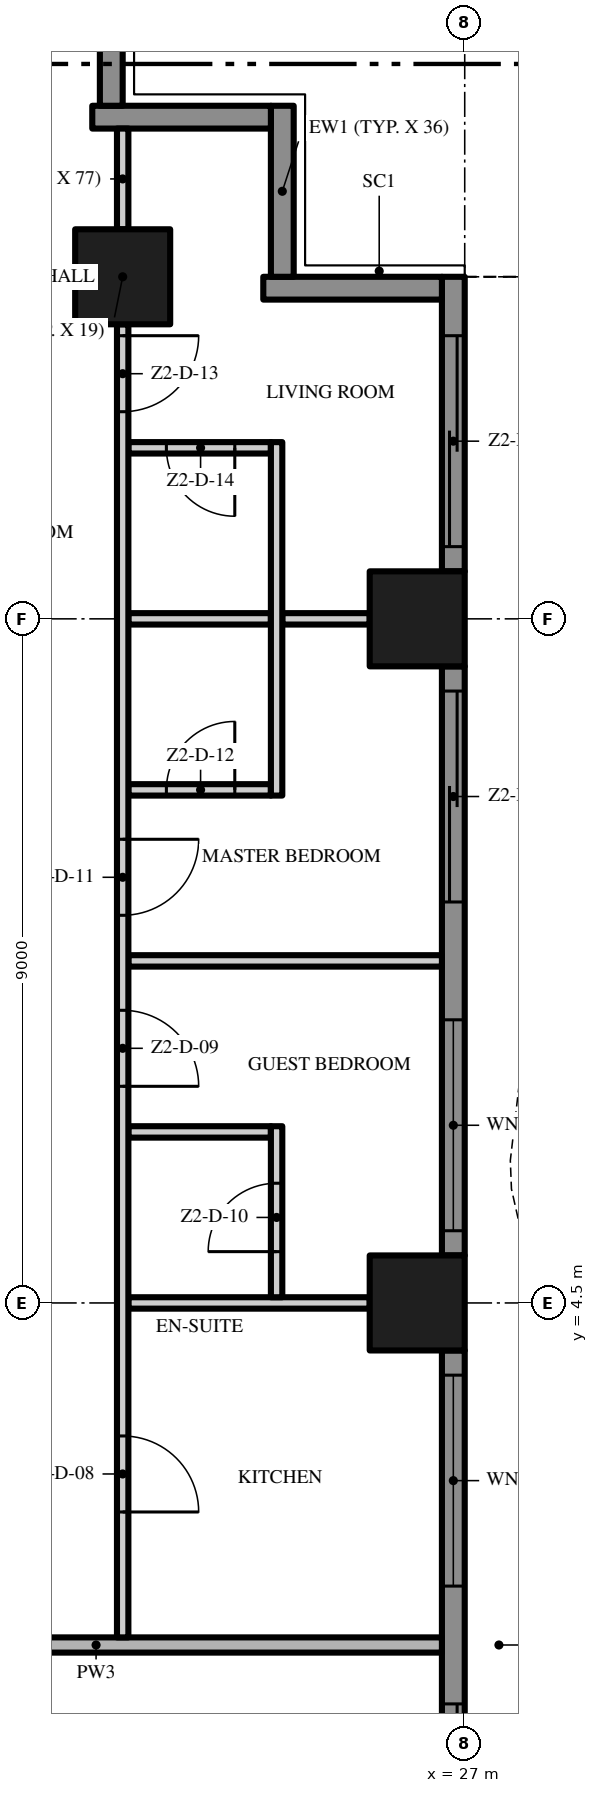
"""IFC4 building model, lengths in metres.
Left out: names, types, materials, properties, quantities, classifications, styles, units other than length and angle.
Written with IfcOpenShell. Run it as: python <this file> out.ifc"""

import sys

from ifc_helpers import new_model, si_unit, direction, frame, frame_2d, origin, origin_2d, place, context, subcontext, project, spatial, polyline, rectangle, outline, extrude, element, fill, save


model = new_model("IFC4")
c1 = context("Model", 3, precision=1e-05, world=origin(), true_north=direction((0.0, 1.0)))
c2 = subcontext(c1, "Body", "Model", "MODEL_VIEW")
j1 = project(units=[si_unit("LENGTHUNIT", "METRE"), si_unit("PLANEANGLEUNIT", "RADIAN")], contexts=[c1])
p1 = place(None, origin())
s1 = spatial("IfcSite", under=j1, at=p1, CompositionType="ELEMENT")
p2 = place(p1, origin())
s2 = spatial("IfcBuilding", under=s1, at=p2, CompositionType="ELEMENT")
p3 = place(p2, frame((0.0, 0.0, 111.2)))
s3 = spatial("IfcBuildingStorey", under=s2, at=p3, CompositionType="ELEMENT", Elevation=111.2)
for number, where, z_axis, x_axis in (
    (1, (26.375, 13.5, 0.0), (0.0, 0.0, 1.0), (1.0, 0.0, 0.0)),
    (2, (22.5, 18.0, 0.0), (0.0, 0.0, 1.0), (1.0, 0.0, 0.0)),
    (3, (26.375, 4.5, 0.0), (0.0, 0.0, 1.0), (1.0, 0.0, 0.0)),
):
    element("IfcColumn", number, at=place(p3, frame(where, z_axis=z_axis, x_axis=x_axis)), inside=s3, PredefinedType="COLUMN", context=c2, shape_type="SweptSolid", body=[
        extrude(rectangle(XDim=1.25, YDim=1.25, at=origin_2d()), origin(), (0.0, 0.0, 1.0), 3.5),
    ])
p4 = place(p3, frame((26.85, 3.875, 0.0), z_axis=(0.0, 0.0, 1.0), x_axis=(0.0, -1.0, 0.0)))
e4 = element("IfcWall", 4, at=p4, inside=s3, PredefinedType="SOLIDWALL", context=c2, shape_type="SweptSolid", body=[
    extrude(rectangle(XDim=7.75, YDim=0.3, at=frame_2d((3.875, 0.0))), origin(), (0.0, 0.0, 1.0), 3.5),
])
p5 = place(p4, frame((4.65, 0.0, 0.0)))
e5 = element("IfcOpeningElement", 5, at=p5, cuts=e4, PredefinedType="OPENING", context=c2, shape_type="SweptSolid", body=[
    extrude(rectangle(XDim=2.775, YDim=2.4, at=frame_2d((1.387, 1.2))), frame((0.0, 0.16, 0.0), z_axis=(0.0, -1.0, 0.0), x_axis=(1.0, 0.0, 0.0)), (0.0, 0.0, 1.0), 0.32),
])
p6 = place(p4, frame((0.325, 0.0, 0.45)))
e6 = element("IfcOpeningElement", 6, at=p6, cuts=e4, PredefinedType="OPENING", context=c2, shape_type="SweptSolid", body=[
    extrude(rectangle(XDim=2.775, YDim=2.65, at=frame_2d((1.387, 1.325))), frame((0.0, 0.16, 0.0), z_axis=(0.0, -1.0, 0.0), x_axis=(1.0, 0.0, 0.0)), (0.0, 0.0, 1.0), 0.32),
])
p7 = place(p3, frame((26.85, 12.875, 0.0), z_axis=(0.0, 0.0, 1.0), x_axis=(0.0, -1.0, 0.0)))
e7 = element("IfcWall", 7, at=p7, inside=s3, PredefinedType="SOLIDWALL", context=c2, shape_type="SweptSolid", body=[
    extrude(rectangle(XDim=7.75, YDim=0.3, at=frame_2d((3.875, 0.0))), origin(), (0.0, 0.0, 1.0), 3.5),
])
p8 = place(p7, frame((4.65, 0.0, 0.45)))
e8 = element("IfcOpeningElement", 8, at=p8, cuts=e7, PredefinedType="OPENING", context=c2, shape_type="SweptSolid", body=[
    extrude(rectangle(XDim=2.775, YDim=2.65, at=frame_2d((1.387, 1.325))), frame((0.0, 0.16, 0.0), z_axis=(0.0, -1.0, 0.0), x_axis=(1.0, 0.0, 0.0)), (0.0, 0.0, 1.0), 0.32),
])
p9 = place(p7, frame((0.325, 0.0, 0.0)))
e9 = element("IfcOpeningElement", 9, at=p9, cuts=e7, PredefinedType="OPENING", context=c2, shape_type="SweptSolid", body=[
    extrude(rectangle(XDim=2.775, YDim=2.4, at=frame_2d((1.387, 1.2))), frame((0.0, 0.16, 0.0), z_axis=(0.0, -1.0, 0.0), x_axis=(1.0, 0.0, 0.0)), (0.0, 0.0, 1.0), 0.32),
])
p10 = place(p3, frame((26.85, 18.0, 0.0), z_axis=(0.0, 0.0, 1.0), x_axis=(0.0, -1.0, 0.0)))
e10 = element("IfcWall", 10, at=p10, inside=s3, PredefinedType="SOLIDWALL", context=c2, shape_type="SweptSolid", body=[
    extrude(rectangle(XDim=3.875, YDim=0.3, at=frame_2d((1.938, 0.0))), origin(), (0.0, 0.0, 1.0), 3.5),
])
p11 = place(p10, frame((0.775, 0.0, 0.0)))
e11 = element("IfcOpeningElement", 11, at=p11, cuts=e10, PredefinedType="OPENING", context=c2, shape_type="SweptSolid", body=[
    extrude(rectangle(XDim=2.775, YDim=2.4, at=frame_2d((1.387, 1.2))), frame((0.0, 0.16, 0.0), z_axis=(0.0, -1.0, 0.0), x_axis=(1.0, 0.0, 0.0)), (0.0, 0.0, 1.0), 0.32),
])
p12 = place(p3, frame((24.35, 17.85, 0.0), z_axis=(0.0, 0.0, 1.0), x_axis=(1.0, 0.0, 0.0)))
e12 = element("IfcWall", 12, at=p12, inside=s3, PredefinedType="SOLIDWALL", context=c2, shape_type="SweptSolid", body=[
    extrude(rectangle(XDim=2.35, YDim=0.3, at=frame_2d((1.175, 0.0))), origin(), (0.0, 0.0, 1.0), 3.5),
])
p13 = place(p3, frame((24.6, 20.25, 0.0), z_axis=(0.0, 0.0, 1.0), x_axis=(0.0, -1.0, 0.0)))
e13 = element("IfcWall", 13, at=p13, inside=s3, PredefinedType="SOLIDWALL", context=c2, shape_type="SweptSolid", body=[
    extrude(rectangle(XDim=2.25, YDim=0.3, at=frame_2d((1.125, 0.0))), origin(), (0.0, 0.0, 1.0), 3.5),
])
p14 = place(p3, frame((22.1, 20.1, 0.0), z_axis=(0.0, 0.0, 1.0), x_axis=(1.0, 0.0, 0.0)))
e14 = element("IfcWall", 14, at=p14, inside=s3, PredefinedType="SOLIDWALL", context=c2, shape_type="SweptSolid", body=[
    extrude(rectangle(XDim=2.35, YDim=0.3, at=frame_2d((1.175, 0.0))), origin(), (0.0, 0.0, 1.0), 3.5),
])
p15 = place(p3, frame((22.35, 22.5, 0.0), z_axis=(0.0, 0.0, 1.0), x_axis=(0.0, -1.0, 0.0)))
e15 = element("IfcWall", 15, at=p15, inside=s3, PredefinedType="SOLIDWALL", context=c2, shape_type="SweptSolid", body=[
    extrude(rectangle(XDim=2.25, YDim=0.3, at=frame_2d((1.125, 0.0))), origin(), (0.0, 0.0, 1.0), 3.5),
])
p16 = place(p3, origin())
e16 = element("IfcWall", 16, at=p16, inside=s3, PredefinedType="USERDEFINED", context=c2, shape_type="SweptSolid", body=[
    extrude(outline(polyline([(29.649, -18.0), (29.985, -16.5), (30.0, -16.125), (29.869, -15.0), (29.345, -13.5), (28.612, -12.0), (27.951, -10.5), (27.615, -9.0), (27.6, -8.625), (27.731, -7.5), (28.255, -6.0), (28.988, -4.5), (29.649, -3.0), (29.985, -1.5), (30.0, -1.125), (29.869, 0.0), (29.345, 1.5), (28.612, 3.0), (27.951, 4.5), (27.615, 6.0), (27.6, 6.375), (27.731, 7.5), (28.255, 9.0), (28.988, 10.5), (29.649, 12.0), (29.985, 13.5), (30.0, 13.875), (29.869, 15.0), (29.345, 16.5), (28.612, 18.0), (28.388, 17.89), (29.114, 16.404), (29.624, 14.944), (29.749, 13.865), (29.736, 13.533), (29.41, 12.079), (28.761, 10.605), (28.024, 9.096), (27.486, 7.556), (27.349, 6.385), (27.366, 5.967), (27.713, 4.421), (28.385, 2.895), (29.114, 1.404), (29.624, -0.056), (29.749, -1.135), (29.736, -1.467), (29.41, -2.921), (28.761, -4.395), (28.024, -5.904), (27.486, -7.444), (27.349, -8.615), (27.366, -9.033), (27.713, -10.579), (28.385, -12.105), (29.114, -13.596), (29.624, -15.056), (29.749, -16.135), (29.736, -16.467), (29.405, -17.945), (29.649, -18.0)])), origin(), (0.0, 0.0, 1.0), 0.9),
])
p17 = place(p3, frame((17.6, 0.0, 0.0), z_axis=(0.0, 0.0, 1.0), x_axis=(1.0, 0.0, 0.0)))
e17 = element("IfcWall", 17, at=p17, inside=s3, PredefinedType="PARTITIONING", context=c2, shape_type="SweptSolid", body=[
    extrude(rectangle(XDim=9.1, YDim=0.2, at=frame_2d((4.55, 0.0))), origin(), (0.0, 0.0, 1.0), 3.5),
])
p18 = place(p3, frame((22.575, 4.5, 0.0), z_axis=(0.0, 0.0, 1.0), x_axis=(1.0, 0.0, 0.0)))
e18 = element("IfcWall", 18, at=p18, inside=s3, PredefinedType="PARTITIONING", context=c2, shape_type="SweptSolid", body=[
    extrude(rectangle(XDim=3.175, YDim=0.15, at=frame_2d((1.587, 0.0))), origin(), (0.0, 0.0, 1.0), 3.5),
])
p19 = place(p3, frame((22.575, 6.75, 0.0), z_axis=(0.0, 0.0, 1.0), x_axis=(1.0, 0.0, 0.0)))
e19 = element("IfcWall", 19, at=p19, inside=s3, PredefinedType="PARTITIONING", context=c2, shape_type="SweptSolid", body=[
    extrude(rectangle(XDim=1.875, YDim=0.15, at=frame_2d((0.938, 0.0))), origin(), (0.0, 0.0, 1.0), 3.5),
])
p20 = place(p3, frame((22.575, 9.0, 0.0), z_axis=(0.0, 0.0, 1.0), x_axis=(1.0, 0.0, 0.0)))
e20 = element("IfcWall", 20, at=p20, inside=s3, PredefinedType="PARTITIONING", context=c2, shape_type="SweptSolid", body=[
    extrude(rectangle(XDim=4.125, YDim=0.15, at=frame_2d((2.062, 0.0))), origin(), (0.0, 0.0, 1.0), 3.5),
])
p21 = place(p3, frame((22.575, 11.25, 0.0), z_axis=(0.0, 0.0, 1.0), x_axis=(1.0, 0.0, 0.0)))
e21 = element("IfcWall", 21, at=p21, inside=s3, PredefinedType="PARTITIONING", context=c2, shape_type="SweptSolid", body=[
    extrude(rectangle(XDim=1.875, YDim=0.15, at=frame_2d((0.938, 0.0))), origin(), (0.0, 0.0, 1.0), 3.5),
])
p22 = place(p21, frame((0.5, 0.0, 0.0)))
e22 = element("IfcOpeningElement", 22, at=p22, cuts=e21, PredefinedType="OPENING", context=c2, shape_type="SweptSolid", body=[
    extrude(rectangle(XDim=0.9, YDim=2.1, at=frame_2d((0.45, 1.05))), frame((0.0, 0.085, 0.0), z_axis=(0.0, -1.0, 0.0), x_axis=(1.0, 0.0, 0.0)), (0.0, 0.0, 1.0), 0.17),
])
p23 = place(p3, frame((22.575, 13.5, 0.0), z_axis=(0.0, 0.0, 1.0), x_axis=(1.0, 0.0, 0.0)))
e23 = element("IfcWall", 23, at=p23, inside=s3, PredefinedType="PARTITIONING", context=c2, shape_type="SweptSolid", body=[
    extrude(rectangle(XDim=1.875, YDim=0.15, at=frame_2d((0.938, 0.0))), origin(), (0.0, 0.0, 1.0), 3.5),
])
p24 = place(p3, frame((24.6, 13.5, 0.0), z_axis=(0.0, 0.0, 1.0), x_axis=(1.0, 0.0, 0.0)))
e24 = element("IfcWall", 24, at=p24, inside=s3, PredefinedType="PARTITIONING", context=c2, shape_type="SweptSolid", body=[
    extrude(rectangle(XDim=1.15, YDim=0.15, at=frame_2d((0.575, 0.0))), origin(), (0.0, 0.0, 1.0), 3.5),
])
p25 = place(p3, frame((24.45, 15.75, 0.0), z_axis=(0.0, 0.0, 1.0), x_axis=(-1.0, 0.0, 0.0)))
e25 = element("IfcWall", 25, at=p25, inside=s3, PredefinedType="PARTITIONING", context=c2, shape_type="SweptSolid", body=[
    extrude(rectangle(XDim=1.875, YDim=0.15, at=frame_2d((0.938, 0.0))), origin(), (0.0, 0.0, 1.0), 3.5),
])
p26 = place(p25, frame((0.475, 0.0, 0.0)))
e26 = element("IfcOpeningElement", 26, at=p26, cuts=e25, PredefinedType="OPENING", context=c2, shape_type="SweptSolid", body=[
    extrude(rectangle(XDim=0.9, YDim=2.1, at=frame_2d((0.45, 1.05))), frame((0.0, 0.085, 0.0), z_axis=(0.0, -1.0, 0.0), x_axis=(1.0, 0.0, 0.0)), (0.0, 0.0, 1.0), 0.17),
])
p27 = place(p3, frame((22.5, 17.375, 0.0), z_axis=(0.0, 0.0, 1.0), x_axis=(0.0, -1.0, 0.0)))
e27 = element("IfcWall", 27, at=p27, inside=s3, PredefinedType="PARTITIONING", context=c2, shape_type="SweptSolid", body=[
    extrude(rectangle(XDim=17.275, YDim=0.15, at=frame_2d((8.637, 0.0))), origin(), (0.0, 0.0, 1.0), 3.5),
])
p28 = place(p27, frame((14.625, 0.0, 0.0)))
e28 = element("IfcOpeningElement", 28, at=p28, cuts=e27, PredefinedType="OPENING", context=c2, shape_type="SweptSolid", body=[
    extrude(rectangle(XDim=1.0, YDim=2.4, at=frame_2d((0.5, 1.2))), frame((0.0, 0.085, 0.0), z_axis=(0.0, -1.0, 0.0), x_axis=(1.0, 0.0, 0.0)), (0.0, 0.0, 1.0), 0.17),
])
p29 = place(p27, frame((9.025, 0.0, 0.0)))
e29 = element("IfcOpeningElement", 29, at=p29, cuts=e27, PredefinedType="OPENING", context=c2, shape_type="SweptSolid", body=[
    extrude(rectangle(XDim=1.0, YDim=2.4, at=frame_2d((0.5, 1.2))), frame((0.0, 0.085, 0.0), z_axis=(0.0, -1.0, 0.0), x_axis=(1.0, 0.0, 0.0)), (0.0, 0.0, 1.0), 0.17),
])
p30 = place(p27, frame((6.775, 0.0, 0.0)))
e30 = element("IfcOpeningElement", 30, at=p30, cuts=e27, PredefinedType="OPENING", context=c2, shape_type="SweptSolid", body=[
    extrude(rectangle(XDim=1.0, YDim=2.4, at=frame_2d((0.5, 1.2))), frame((0.0, 0.085, 0.0), z_axis=(0.0, -1.0, 0.0), x_axis=(1.0, 0.0, 0.0)), (0.0, 0.0, 1.0), 0.17),
])
p31 = place(p27, frame((0.15, 0.0, 0.0)))
e31 = element("IfcOpeningElement", 31, at=p31, cuts=e27, PredefinedType="OPENING", context=c2, shape_type="SweptSolid", body=[
    extrude(rectangle(XDim=1.0, YDim=2.4, at=frame_2d((0.5, 1.2))), frame((0.0, 0.085, 0.0), z_axis=(0.0, -1.0, 0.0), x_axis=(1.0, 0.0, 0.0)), (0.0, 0.0, 1.0), 0.17),
])
p32 = place(p3, frame((22.5, 18.625, 0.0), z_axis=(0.0, 0.0, 1.0), x_axis=(0.0, 1.0, 0.0)))
e32 = element("IfcWall", 32, at=p32, inside=s3, PredefinedType="PARTITIONING", context=c2, shape_type="SweptSolid", body=[
    extrude(rectangle(XDim=1.325, YDim=0.15, at=frame_2d((0.662, 0.0))), origin(), (0.0, 0.0, 1.0), 3.5),
])
p33 = place(p3, frame((24.525, 4.575, 0.0), z_axis=(0.0, 0.0, 1.0), x_axis=(0.0, 1.0, 0.0)))
e33 = element("IfcWall", 33, at=p33, inside=s3, PredefinedType="PARTITIONING", context=c2, shape_type="SweptSolid", body=[
    extrude(rectangle(XDim=2.25, YDim=0.15, at=frame_2d((1.125, 0.0))), origin(), (0.0, 0.0, 1.0), 3.5),
])
p34 = place(p33, frame((0.6, 0.0, 0.0)))
e34 = element("IfcOpeningElement", 34, at=p34, cuts=e33, PredefinedType="OPENING", context=c2, shape_type="SweptSolid", body=[
    extrude(rectangle(XDim=0.9, YDim=2.1, at=frame_2d((0.45, 1.05))), frame((0.0, 0.085, 0.0), z_axis=(0.0, -1.0, 0.0), x_axis=(1.0, 0.0, 0.0)), (0.0, 0.0, 1.0), 0.17),
])
p35 = place(p3, frame((24.525, 11.175, 0.0), z_axis=(0.0, 0.0, 1.0), x_axis=(0.0, 1.0, 0.0)))
e35 = element("IfcWall", 35, at=p35, inside=s3, PredefinedType="PARTITIONING", context=c2, shape_type="SweptSolid", body=[
    extrude(rectangle(XDim=4.65, YDim=0.15, at=frame_2d((2.325, 0.0))), origin(), (0.0, 0.0, 1.0), 3.5),
])
p36 = place(p5, origin())
e36 = element("IfcDoor", 36, at=p36, inside=s3, OperationType="SINGLE_SWING_LEFT", PredefinedType="DOOR", context=c2, shape_type="SweptSolid", body=[
    extrude(rectangle(XDim=2.775, YDim=2.4, at=frame_2d((1.387, 1.2))), frame((0.0, 0.025, 0.0), z_axis=(0.0, -1.0, 0.0), x_axis=(1.0, 0.0, 0.0)), (0.0, 0.0, 1.0), 0.05),
])
fill(e5, e36)
p37 = place(p6, origin())
e37 = element("IfcWindow", 37, at=p37, inside=s3, PartitioningType="SINGLE_PANEL", PredefinedType="WINDOW", context=c2, shape_type="SweptSolid", body=[
    extrude(rectangle(XDim=2.775, YDim=2.65, at=frame_2d((1.387, 1.325))), frame((0.0, 0.03, 0.0), z_axis=(0.0, -1.0, 0.0), x_axis=(1.0, 0.0, 0.0)), (0.0, 0.0, 1.0), 0.06),
])
fill(e6, e37)
p38 = place(p8, origin())
e38 = element("IfcWindow", 38, at=p38, inside=s3, PartitioningType="SINGLE_PANEL", PredefinedType="WINDOW", context=c2, shape_type="SweptSolid", body=[
    extrude(rectangle(XDim=2.775, YDim=2.65, at=frame_2d((1.387, 1.325))), frame((0.0, 0.03, 0.0), z_axis=(0.0, -1.0, 0.0), x_axis=(1.0, 0.0, 0.0)), (0.0, 0.0, 1.0), 0.06),
])
fill(e8, e38)
p39 = place(p9, origin())
e39 = element("IfcDoor", 39, at=p39, inside=s3, OperationType="SINGLE_SWING_LEFT", PredefinedType="DOOR", context=c2, shape_type="SweptSolid", body=[
    extrude(rectangle(XDim=2.775, YDim=2.4, at=frame_2d((1.387, 1.2))), frame((0.0, 0.025, 0.0), z_axis=(0.0, -1.0, 0.0), x_axis=(1.0, 0.0, 0.0)), (0.0, 0.0, 1.0), 0.05),
])
fill(e9, e39)
p40 = place(p11, origin())
e40 = element("IfcDoor", 40, at=p40, inside=s3, OperationType="SINGLE_SWING_LEFT", PredefinedType="DOOR", context=c2, shape_type="SweptSolid", body=[
    extrude(rectangle(XDim=2.775, YDim=2.4, at=frame_2d((1.387, 1.2))), frame((0.0, 0.025, 0.0), z_axis=(0.0, -1.0, 0.0), x_axis=(1.0, 0.0, 0.0)), (0.0, 0.0, 1.0), 0.05),
])
fill(e11, e40)
p41 = place(p28, origin())
e41 = element("IfcDoor", 41, at=p41, inside=s3, OperationType="SINGLE_SWING_RIGHT", PredefinedType="DOOR", context=c2, shape_type="SweptSolid", body=[
    extrude(rectangle(XDim=1.0, YDim=2.4, at=frame_2d((0.5, 1.2))), frame((0.0, 0.025, 0.0), z_axis=(0.0, -1.0, 0.0), x_axis=(1.0, 0.0, 0.0)), (0.0, 0.0, 1.0), 0.05),
])
fill(e28, e41)
p42 = place(p29, origin())
e42 = element("IfcDoor", 42, at=p42, inside=s3, OperationType="SINGLE_SWING_RIGHT", PredefinedType="DOOR", context=c2, shape_type="SweptSolid", body=[
    extrude(rectangle(XDim=1.0, YDim=2.4, at=frame_2d((0.5, 1.2))), frame((0.0, 0.025, 0.0), z_axis=(0.0, -1.0, 0.0), x_axis=(1.0, 0.0, 0.0)), (0.0, 0.0, 1.0), 0.05),
])
fill(e29, e42)
p43 = place(p34, origin())
e43 = element("IfcDoor", 43, at=p43, inside=s3, OperationType="SINGLE_SWING_LEFT", PredefinedType="DOOR", context=c2, shape_type="SweptSolid", body=[
    extrude(rectangle(XDim=0.9, YDim=2.1, at=frame_2d((0.45, 1.05))), frame((0.0, 0.025, 0.0), z_axis=(0.0, -1.0, 0.0), x_axis=(1.0, 0.0, 0.0)), (0.0, 0.0, 1.0), 0.05),
])
fill(e34, e43)
p44 = place(p30, origin())
e44 = element("IfcDoor", 44, at=p44, inside=s3, OperationType="SINGLE_SWING_LEFT", PredefinedType="DOOR", context=c2, shape_type="SweptSolid", body=[
    extrude(rectangle(XDim=1.0, YDim=2.4, at=frame_2d((0.5, 1.2))), frame((0.0, 0.025, 0.0), z_axis=(0.0, -1.0, 0.0), x_axis=(1.0, 0.0, 0.0)), (0.0, 0.0, 1.0), 0.05),
])
fill(e30, e44)
p45 = place(p22, origin())
e45 = element("IfcDoor", 45, at=p45, inside=s3, OperationType="SINGLE_SWING_RIGHT", PredefinedType="DOOR", context=c2, shape_type="SweptSolid", body=[
    extrude(rectangle(XDim=0.9, YDim=2.1, at=frame_2d((0.45, 1.05))), frame((0.0, 0.025, 0.0), z_axis=(0.0, -1.0, 0.0), x_axis=(1.0, 0.0, 0.0)), (0.0, 0.0, 1.0), 0.05),
])
fill(e22, e45)
p46 = place(p31, origin())
e46 = element("IfcDoor", 46, at=p46, inside=s3, OperationType="SINGLE_SWING_LEFT", PredefinedType="DOOR", context=c2, shape_type="SweptSolid", body=[
    extrude(rectangle(XDim=1.0, YDim=2.4, at=frame_2d((0.5, 1.2))), frame((0.0, 0.025, 0.0), z_axis=(0.0, -1.0, 0.0), x_axis=(1.0, 0.0, 0.0)), (0.0, 0.0, 1.0), 0.05),
])
fill(e31, e46)
p47 = place(p26, origin())
e47 = element("IfcDoor", 47, at=p47, inside=s3, OperationType="SINGLE_SWING_LEFT", PredefinedType="DOOR", context=c2, shape_type="SweptSolid", body=[
    extrude(rectangle(XDim=0.9, YDim=2.1, at=frame_2d((0.45, 1.05))), frame((0.0, 0.025, 0.0), z_axis=(0.0, -1.0, 0.0), x_axis=(1.0, 0.0, 0.0)), (0.0, 0.0, 1.0), 0.05),
])
fill(e26, e47)
save(model, sys.argv[1])
